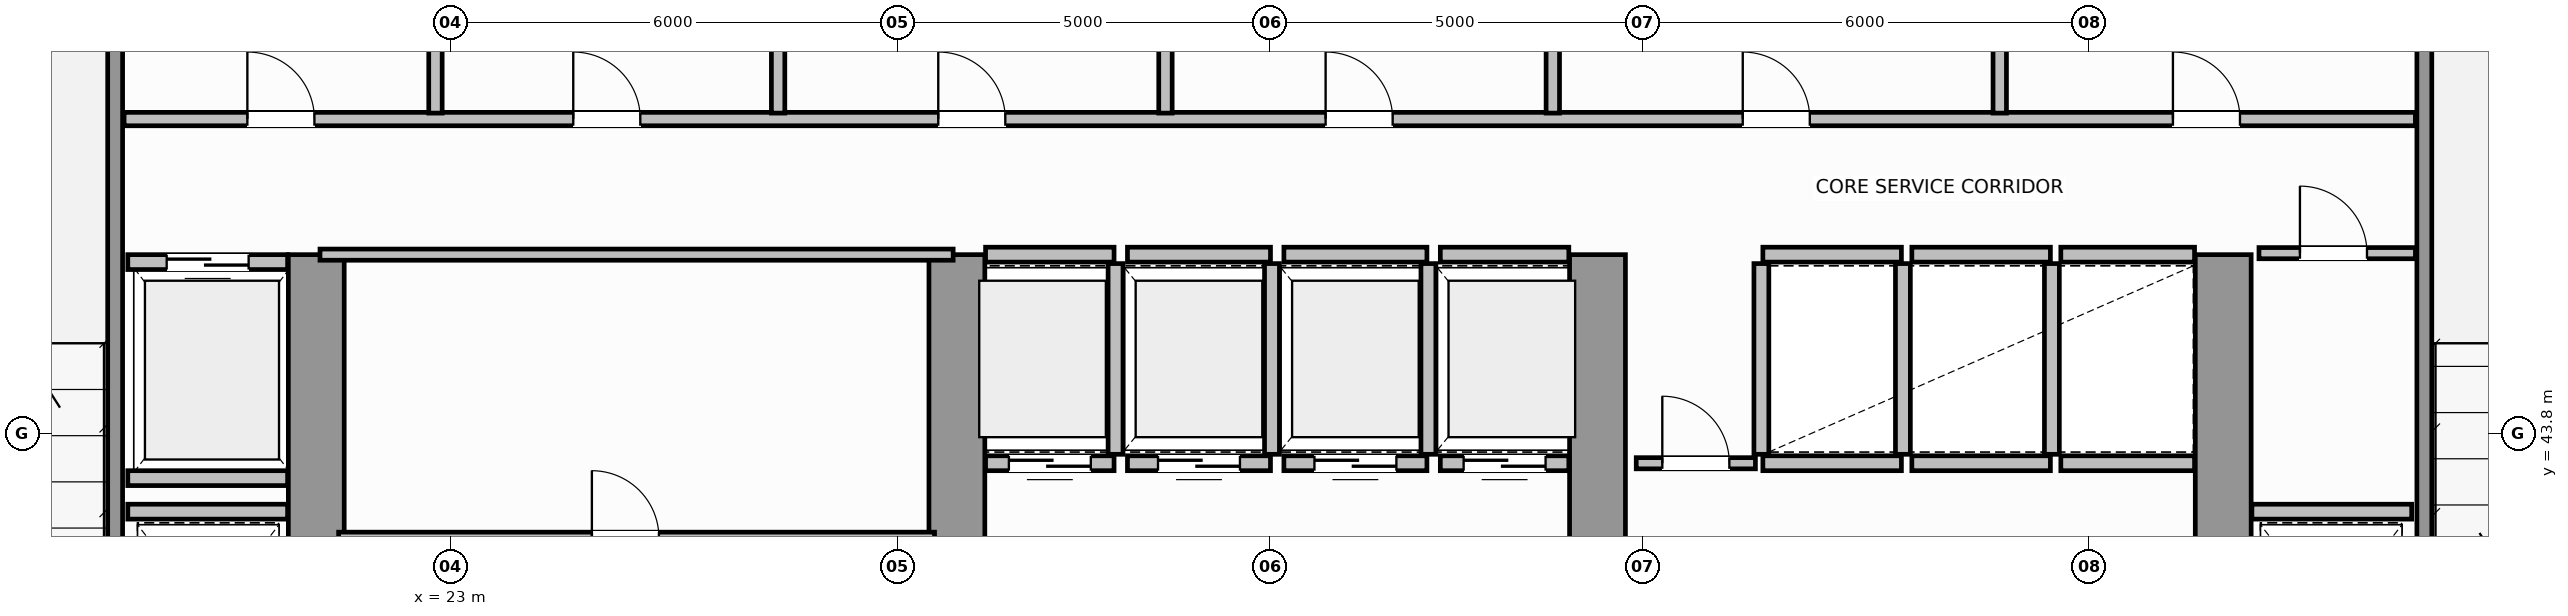
"""IFC4 building model, lengths in metres.
Left out: names, types, materials, properties, quantities, classifications, styles, units other than length and angle.
Written with IfcOpenShell. Run it as: python <this file> out.ifc"""

import sys

from ifc_helpers import new_model, si_unit, direction, frame, frame_2d, origin, place, context, subcontext, project, spatial, rectangle, extrude, source, transform, mapped, element, fill, save


model = new_model("IFC4")
c1 = context("Model", 3, precision=1e-05, world=origin(), true_north=direction((0.0, 1.0)))
c2 = subcontext(c1, "Body", "Model", "MODEL_VIEW")
j1 = project(units=[si_unit("LENGTHUNIT", "METRE"), si_unit("PLANEANGLEUNIT", "RADIAN")], contexts=[c1])
p1 = place(None, origin())
s1 = spatial("IfcSite", under=j1, at=p1, CompositionType="ELEMENT")
p2 = place(p1, origin())
s2 = spatial("IfcBuilding", under=s1, at=p2, CompositionType="ELEMENT")
p3 = place(p2, frame((0.0, 0.0, 126.2)))
s3 = spatial("IfcBuildingStorey", under=s2, at=p3, CompositionType="ELEMENT", Elevation=126.2)
for number, where, z_axis, x_axis in (
    (1, (21.2, 36.895, 0.0), (0.0, 0.0, 1.0), (0.0, 1.0, 0.0)),
    (2, (29.8, 36.895, 0.0), (0.0, 0.0, 1.0), (0.0, 1.0, 0.0)),
    (3, (38.4, 36.895, 0.0), (0.0, 0.0, 1.0), (0.0, 1.0, 0.0)),
    (4, (46.8, 36.895, 0.0), (0.0, 0.0, 1.0), (0.0, 1.0, 0.0)),
):
    element("IfcWall", number, at=place(p3, frame(where, z_axis=z_axis, x_axis=x_axis)), inside=s3, PredefinedType="SHEAR", context=c2, shape_type="SweptSolid", body=[
        extrude(rectangle(XDim=9.305, YDim=0.75, at=frame_2d((4.652, 0.0))), origin(), (0.0, 0.0, 1.0), 3.8),
    ])
for number, where, z_axis, x_axis in (
    (5, (18.5, 39.96, 0.0), (0.0, 0.0, 1.0), (0.0, 1.0, 0.0)),
    (6, (49.5, 39.96, 0.0), (0.0, 0.0, 1.0), (0.0, 1.0, 0.0)),
):
    element("IfcWall", number, at=place(p3, frame(where, z_axis=z_axis, x_axis=x_axis)), inside=s3, PredefinedType="SOLIDWALL", context=c2, shape_type="SweptSolid", body=[
        extrude(rectangle(XDim=9.93, YDim=0.2, at=frame_2d((4.965, 0.0))), origin(), (0.0, 0.0, 1.0), 3.8),
    ])
p4 = place(p3, frame((30.185, 43.4, 0.0), z_axis=(0.0, 0.0, 1.0), x_axis=(1.0, 0.0, 0.0)))
e7 = element("IfcWall", 7, at=p4, inside=s3, PredefinedType="SOLIDWALL", context=c2, shape_type="SweptSolid", body=[
    extrude(rectangle(XDim=1.725, YDim=0.2, at=frame_2d((0.862, 0.0))), origin(), (0.0, 0.0, 1.0), 3.58),
])
p5 = place(p4, frame((0.313, 0.0, 0.0)))
e8 = element("IfcOpeningElement", 8, at=p5, cuts=e7, PredefinedType="OPENING", context=c2, shape_type="SweptSolid", body=[
    extrude(rectangle(XDim=1.1, YDim=2.15, at=frame_2d((0.55, 1.075))), frame((0.0, 0.11, 0.0), z_axis=(0.0, -1.0, 0.0), x_axis=(1.0, 0.0, 0.0)), (0.0, 0.0, 1.0), 0.22),
])
p6 = place(p3, frame((30.185, 46.2, 0.0), z_axis=(0.0, 0.0, 1.0), x_axis=(1.0, 0.0, 0.0)))
e9 = element("IfcWall", 9, at=p6, inside=s3, PredefinedType="SOLIDWALL", context=c2, shape_type="SweptSolid", body=[
    extrude(rectangle(XDim=1.725, YDim=0.2, at=frame_2d((0.862, 0.0))), origin(), (0.0, 0.0, 1.0), 3.58),
])
p7 = place(p3, frame((31.93, 43.52, 0.0), z_axis=(0.0, 0.0, 1.0), x_axis=(0.0, 1.0, 0.0)))
e10 = element("IfcWall", 10, at=p7, inside=s3, PredefinedType="SOLIDWALL", context=c2, shape_type="SweptSolid", body=[
    extrude(rectangle(XDim=2.56, YDim=0.2, at=frame_2d((1.28, 0.0))), origin(), (0.0, 0.0, 1.0), 3.58),
])
p8 = place(p3, frame((32.09, 43.4, 0.0), z_axis=(0.0, 0.0, 1.0), x_axis=(1.0, 0.0, 0.0)))
e11 = element("IfcWall", 11, at=p8, inside=s3, PredefinedType="SOLIDWALL", context=c2, shape_type="SweptSolid", body=[
    extrude(rectangle(XDim=1.92, YDim=0.2, at=frame_2d((0.96, 0.0))), origin(), (0.0, 0.0, 1.0), 3.58),
])
p9 = place(p8, frame((0.41, 0.0, 0.0)))
e12 = element("IfcOpeningElement", 12, at=p9, cuts=e11, PredefinedType="OPENING", context=c2, shape_type="SweptSolid", body=[
    extrude(rectangle(XDim=1.1, YDim=2.15, at=frame_2d((0.55, 1.075))), frame((0.0, 0.11, 0.0), z_axis=(0.0, -1.0, 0.0), x_axis=(1.0, 0.0, 0.0)), (0.0, 0.0, 1.0), 0.22),
])
p10 = place(p3, frame((32.09, 46.2, 0.0), z_axis=(0.0, 0.0, 1.0), x_axis=(1.0, 0.0, 0.0)))
e13 = element("IfcWall", 13, at=p10, inside=s3, PredefinedType="SOLIDWALL", context=c2, shape_type="SweptSolid", body=[
    extrude(rectangle(XDim=1.92, YDim=0.2, at=frame_2d((0.96, 0.0))), origin(), (0.0, 0.0, 1.0), 3.58),
])
p11 = place(p3, frame((34.03, 43.52, 0.0), z_axis=(0.0, 0.0, 1.0), x_axis=(0.0, 1.0, 0.0)))
e14 = element("IfcWall", 14, at=p11, inside=s3, PredefinedType="SOLIDWALL", context=c2, shape_type="SweptSolid", body=[
    extrude(rectangle(XDim=2.56, YDim=0.2, at=frame_2d((1.28, 0.0))), origin(), (0.0, 0.0, 1.0), 3.58),
])
p12 = place(p3, frame((34.19, 43.4, 0.0), z_axis=(0.0, 0.0, 1.0), x_axis=(1.0, 0.0, 0.0)))
e15 = element("IfcWall", 15, at=p12, inside=s3, PredefinedType="SOLIDWALL", context=c2, shape_type="SweptSolid", body=[
    extrude(rectangle(XDim=1.92, YDim=0.2, at=frame_2d((0.96, 0.0))), origin(), (0.0, 0.0, 1.0), 3.58),
])
p13 = place(p12, frame((0.41, 0.0, 0.0)))
e16 = element("IfcOpeningElement", 16, at=p13, cuts=e15, PredefinedType="OPENING", context=c2, shape_type="SweptSolid", body=[
    extrude(rectangle(XDim=1.1, YDim=2.15, at=frame_2d((0.55, 1.075))), frame((0.0, 0.11, 0.0), z_axis=(0.0, -1.0, 0.0), x_axis=(1.0, 0.0, 0.0)), (0.0, 0.0, 1.0), 0.22),
])
p14 = place(p3, frame((34.19, 46.2, 0.0), z_axis=(0.0, 0.0, 1.0), x_axis=(1.0, 0.0, 0.0)))
e17 = element("IfcWall", 17, at=p14, inside=s3, PredefinedType="SOLIDWALL", context=c2, shape_type="SweptSolid", body=[
    extrude(rectangle(XDim=1.92, YDim=0.2, at=frame_2d((0.96, 0.0))), origin(), (0.0, 0.0, 1.0), 3.58),
])
p15 = place(p3, frame((36.13, 43.52, 0.0), z_axis=(0.0, 0.0, 1.0), x_axis=(0.0, 1.0, 0.0)))
e18 = element("IfcWall", 18, at=p15, inside=s3, PredefinedType="SOLIDWALL", context=c2, shape_type="SweptSolid", body=[
    extrude(rectangle(XDim=2.56, YDim=0.2, at=frame_2d((1.28, 0.0))), origin(), (0.0, 0.0, 1.0), 3.58),
])
p16 = place(p3, frame((36.29, 43.4, 0.0), z_axis=(0.0, 0.0, 1.0), x_axis=(1.0, 0.0, 0.0)))
e19 = element("IfcWall", 19, at=p16, inside=s3, PredefinedType="SOLIDWALL", context=c2, shape_type="SweptSolid", body=[
    extrude(rectangle(XDim=1.725, YDim=0.2, at=frame_2d((0.862, 0.0))), origin(), (0.0, 0.0, 1.0), 3.58),
])
p17 = place(p16, frame((0.313, 0.0, 0.0)))
e20 = element("IfcOpeningElement", 20, at=p17, cuts=e19, PredefinedType="OPENING", context=c2, shape_type="SweptSolid", body=[
    extrude(rectangle(XDim=1.1, YDim=2.15, at=frame_2d((0.55, 1.075))), frame((0.0, 0.11, 0.0), z_axis=(0.0, -1.0, 0.0), x_axis=(1.0, 0.0, 0.0)), (0.0, 0.0, 1.0), 0.22),
])
p18 = place(p3, frame((36.29, 46.2, 0.0), z_axis=(0.0, 0.0, 1.0), x_axis=(1.0, 0.0, 0.0)))
e21 = element("IfcWall", 21, at=p18, inside=s3, PredefinedType="SOLIDWALL", context=c2, shape_type="SweptSolid", body=[
    extrude(rectangle(XDim=1.725, YDim=0.2, at=frame_2d((0.862, 0.0))), origin(), (0.0, 0.0, 1.0), 3.58),
])
for number, where, z_axis, x_axis in (
    (22, (40.62, 43.4, 0.0), (0.0, 0.0, 1.0), (1.0, 0.0, 0.0)),
    (23, (40.62, 46.2, 0.0), (0.0, 0.0, 1.0), (1.0, 0.0, 0.0)),
):
    element("IfcWall", number, at=place(p3, frame(where, z_axis=z_axis, x_axis=x_axis)), inside=s3, PredefinedType="SOLIDWALL", context=c2, shape_type="SweptSolid", body=[
        extrude(rectangle(XDim=1.86, YDim=0.2, at=frame_2d((0.93, 0.0))), origin(), (0.0, 0.0, 1.0), 3.58),
    ])
for number, where, z_axis, x_axis in (
    (24, (40.6, 43.52, 0.0), (0.0, 0.0, 1.0), (0.0, 1.0, 0.0)),
    (25, (42.5, 43.52, 0.0), (0.0, 0.0, 1.0), (0.0, 1.0, 0.0)),
):
    element("IfcWall", number, at=place(p3, frame(where, z_axis=z_axis, x_axis=x_axis)), inside=s3, PredefinedType="SOLIDWALL", context=c2, shape_type="SweptSolid", body=[
        extrude(rectangle(XDim=2.56, YDim=0.2, at=frame_2d((1.28, 0.0))), origin(), (0.0, 0.0, 1.0), 3.58),
    ])
for number, where, z_axis, x_axis in (
    (26, (42.62, 43.4, 0.0), (0.0, 0.0, 1.0), (1.0, 0.0, 0.0)),
    (27, (42.62, 46.2, 0.0), (0.0, 0.0, 1.0), (1.0, 0.0, 0.0)),
):
    element("IfcWall", number, at=place(p3, frame(where, z_axis=z_axis, x_axis=x_axis)), inside=s3, PredefinedType="SOLIDWALL", context=c2, shape_type="SweptSolid", body=[
        extrude(rectangle(XDim=1.86, YDim=0.2, at=frame_2d((0.93, 0.0))), origin(), (0.0, 0.0, 1.0), 3.58),
    ])
p19 = place(p3, frame((44.5, 43.52, 0.0), z_axis=(0.0, 0.0, 1.0), x_axis=(0.0, 1.0, 0.0)))
e28 = element("IfcWall", 28, at=p19, inside=s3, PredefinedType="SOLIDWALL", context=c2, shape_type="SweptSolid", body=[
    extrude(rectangle(XDim=2.56, YDim=0.2, at=frame_2d((1.28, 0.0))), origin(), (0.0, 0.0, 1.0), 3.58),
])
for number, where, z_axis, x_axis in (
    (29, (44.62, 43.4, 0.0), (0.0, 0.0, 1.0), (1.0, 0.0, 0.0)),
    (30, (44.62, 46.2, 0.0), (0.0, 0.0, 1.0), (1.0, 0.0, 0.0)),
):
    element("IfcWall", number, at=place(p3, frame(where, z_axis=z_axis, x_axis=x_axis)), inside=s3, PredefinedType="SOLIDWALL", context=c2, shape_type="SweptSolid", body=[
        extrude(rectangle(XDim=1.795, YDim=0.2, at=frame_2d((0.897, 0.0))), origin(), (0.0, 0.0, 1.0), 3.58),
    ])
p20 = place(p3, frame((18.67, 46.1, 0.0), z_axis=(0.0, 0.0, 1.0), x_axis=(1.0, 0.0, 0.0)))
e31 = element("IfcWall", 31, at=p20, inside=s3, PredefinedType="SOLIDWALL", context=c2, shape_type="SweptSolid", body=[
    extrude(rectangle(XDim=2.145, YDim=0.2, at=frame_2d((1.073, 0.0))), origin(), (0.0, 0.0, 1.0), 3.58),
])
p21 = place(p20, frame((0.522, 0.0, 0.0)))
e32 = element("IfcOpeningElement", 32, at=p21, cuts=e31, PredefinedType="OPENING", context=c2, shape_type="SweptSolid", body=[
    extrude(rectangle(XDim=1.1, YDim=2.15, at=frame_2d((0.55, 1.075))), frame((0.0, 0.11, 0.0), z_axis=(0.0, -1.0, 0.0), x_axis=(1.0, 0.0, 0.0)), (0.0, 0.0, 1.0), 0.22),
])
for number, where, z_axis, x_axis in (
    (33, (18.67, 43.2, 0.0), (0.0, 0.0, 1.0), (1.0, 0.0, 0.0)),
    (34, (18.67, 42.75, 0.0), (0.0, 0.0, 1.0), (1.0, 0.0, 0.0)),
    (35, (47.185, 42.75, 0.0), (0.0, 0.0, 1.0), (1.0, 0.0, 0.0)),
):
    element("IfcWall", number, at=place(p3, frame(where, z_axis=z_axis, x_axis=x_axis)), inside=s3, PredefinedType="SOLIDWALL", context=c2, shape_type="SweptSolid", body=[
        extrude(rectangle(XDim=2.145, YDim=0.2, at=frame_2d((1.073, 0.0))), origin(), (0.0, 0.0, 1.0), 3.58),
    ])
p22 = place(p3, frame((21.25, 46.2, 0.0), z_axis=(0.0, 0.0, 1.0), x_axis=(1.0, 0.0, 0.0)))
e36 = element("IfcWall", 36, at=p22, inside=s3, PredefinedType="PARTITIONING", context=c2, shape_type="SweptSolid", body=[
    extrude(rectangle(XDim=8.5, YDim=0.15, at=frame_2d((4.25, 0.0))), origin(), (0.0, 0.0, 1.0), 3.58),
])
p23 = place(p3, frame((21.5, 42.4, 0.0), z_axis=(0.0, 0.0, 1.0), x_axis=(1.0, 0.0, 0.0)))
e37 = element("IfcWall", 37, at=p23, inside=s3, PredefinedType="PARTITIONING", context=c2, shape_type="SweptSolid", body=[
    extrude(rectangle(XDim=8.0, YDim=0.15, at=frame_2d((4.0, 0.0))), origin(), (0.0, 0.0, 1.0), 3.58),
])
p24 = place(p23, frame((3.4, 0.0, 0.0)))
e38 = element("IfcOpeningElement", 38, at=p24, cuts=e37, PredefinedType="OPENING", context=c2, shape_type="SweptSolid", body=[
    extrude(rectangle(XDim=0.9, YDim=2.1, at=frame_2d((0.45, 1.05))), frame((0.0, 0.085, 0.0), z_axis=(0.0, -1.0, 0.0), x_axis=(1.0, 0.0, 0.0)), (0.0, 0.0, 1.0), 0.17),
])
p25 = place(p3, frame((47.28, 46.22, 0.0), z_axis=(0.0, 0.0, 1.0), x_axis=(1.0, 0.0, 0.0)))
e39 = element("IfcWall", 39, at=p25, inside=s3, PredefinedType="PARTITIONING", context=c2, shape_type="SweptSolid", body=[
    extrude(rectangle(XDim=2.1, YDim=0.15, at=frame_2d((1.05, 0.0))), origin(), (0.0, 0.0, 1.0), 3.58),
])
p26 = place(p25, frame((0.55, 0.0, 0.0)))
e40 = element("IfcOpeningElement", 40, at=p26, cuts=e39, PredefinedType="OPENING", context=c2, shape_type="SweptSolid", body=[
    extrude(rectangle(XDim=0.9, YDim=2.1, at=frame_2d((0.45, 1.05))), frame((0.0, 0.085, 0.0), z_axis=(0.0, -1.0, 0.0), x_axis=(1.0, 0.0, 0.0)), (0.0, 0.0, 1.0), 0.17),
])
p27 = place(p3, frame((38.92, 43.4, 0.0), z_axis=(0.0, 0.0, 1.0), x_axis=(1.0, 0.0, 0.0)))
e41 = element("IfcWall", 41, at=p27, inside=s3, PredefinedType="PARTITIONING", context=c2, shape_type="SweptSolid", body=[
    extrude(rectangle(XDim=1.6, YDim=0.15, at=frame_2d((0.8, 0.0))), origin(), (0.0, 0.0, 1.0), 3.58),
])
p28 = place(p27, frame((0.35, 0.0, 0.0)))
e42 = element("IfcOpeningElement", 42, at=p28, cuts=e41, PredefinedType="OPENING", context=c2, shape_type="SweptSolid", body=[
    extrude(rectangle(XDim=0.9, YDim=2.1, at=frame_2d((0.45, 1.05))), frame((0.0, 0.085, 0.0), z_axis=(0.0, -1.0, 0.0), x_axis=(1.0, 0.0, 0.0)), (0.0, 0.0, 1.0), 0.17),
])
p29 = place(p3, frame((18.62, 48.02, 0.0), z_axis=(0.0, 0.0, 1.0), x_axis=(1.0, 0.0, 0.0)))
e43 = element("IfcWall", 43, at=p29, inside=s3, PredefinedType="PLUMBINGWALL", context=c2, shape_type="SweptSolid", body=[
    extrude(rectangle(XDim=30.76, YDim=0.18, at=frame_2d((15.38, 0.0))), origin(), (0.0, 0.0, 1.0), 3.58),
])
p30 = place(p29, frame((1.655, 0.0, 0.0)))
e44 = element("IfcOpeningElement", 44, at=p30, cuts=e43, PredefinedType="OPENING", context=c2, shape_type="SweptSolid", body=[
    extrude(rectangle(XDim=0.9, YDim=2.15, at=frame_2d((0.45, 1.075))), frame((0.0, 0.1, 0.0), z_axis=(0.0, -1.0, 0.0), x_axis=(1.0, 0.0, 0.0)), (0.0, 0.0, 1.0), 0.2),
])
p31 = place(p29, frame((6.03, 0.0, 0.0)))
e45 = element("IfcOpeningElement", 45, at=p31, cuts=e43, PredefinedType="OPENING", context=c2, shape_type="SweptSolid", body=[
    extrude(rectangle(XDim=0.9, YDim=2.15, at=frame_2d((0.45, 1.075))), frame((0.0, 0.1, 0.0), z_axis=(0.0, -1.0, 0.0), x_axis=(1.0, 0.0, 0.0)), (0.0, 0.0, 1.0), 0.2),
])
p32 = place(p29, frame((10.93, 0.0, 0.0)))
e46 = element("IfcOpeningElement", 46, at=p32, cuts=e43, PredefinedType="OPENING", context=c2, shape_type="SweptSolid", body=[
    extrude(rectangle(XDim=0.9, YDim=2.15, at=frame_2d((0.45, 1.075))), frame((0.0, 0.1, 0.0), z_axis=(0.0, -1.0, 0.0), x_axis=(1.0, 0.0, 0.0)), (0.0, 0.0, 1.0), 0.2),
])
p33 = place(p29, frame((16.13, 0.0, 0.0)))
e47 = element("IfcOpeningElement", 47, at=p33, cuts=e43, PredefinedType="OPENING", context=c2, shape_type="SweptSolid", body=[
    extrude(rectangle(XDim=0.9, YDim=2.15, at=frame_2d((0.45, 1.075))), frame((0.0, 0.1, 0.0), z_axis=(0.0, -1.0, 0.0), x_axis=(1.0, 0.0, 0.0)), (0.0, 0.0, 1.0), 0.2),
])
p34 = place(p29, frame((21.73, 0.0, 0.0)))
e48 = element("IfcOpeningElement", 48, at=p34, cuts=e43, PredefinedType="OPENING", context=c2, shape_type="SweptSolid", body=[
    extrude(rectangle(XDim=0.9, YDim=2.15, at=frame_2d((0.45, 1.075))), frame((0.0, 0.1, 0.0), z_axis=(0.0, -1.0, 0.0), x_axis=(1.0, 0.0, 0.0)), (0.0, 0.0, 1.0), 0.2),
])
p35 = place(p29, frame((27.505, 0.0, 0.0)))
e49 = element("IfcOpeningElement", 49, at=p35, cuts=e43, PredefinedType="OPENING", context=c2, shape_type="SweptSolid", body=[
    extrude(rectangle(XDim=0.9, YDim=2.15, at=frame_2d((0.45, 1.075))), frame((0.0, 0.1, 0.0), z_axis=(0.0, -1.0, 0.0), x_axis=(1.0, 0.0, 0.0)), (0.0, 0.0, 1.0), 0.2),
])
p36 = place(p3, frame((22.8, 48.1, 0.0), z_axis=(0.0, 0.0, 1.0), x_axis=(0.0, 1.0, 0.0)))
e50 = element("IfcWall", 50, at=p36, inside=s3, PredefinedType="PLUMBINGWALL", context=c2, shape_type="SweptSolid", body=[
    extrude(rectangle(XDim=2.13, YDim=0.18, at=frame_2d((1.065, 0.0))), origin(), (0.0, 0.0, 1.0), 2.87),
])
for number, where, z_axis, x_axis in (
    (51, (27.4, 48.1, 0.0), (0.0, 0.0, 1.0), (0.0, 1.0, 0.0)),
    (52, (32.6, 48.1, 0.0), (0.0, 0.0, 1.0), (0.0, 1.0, 0.0)),
    (53, (37.8, 48.1, 0.0), (0.0, 0.0, 1.0), (0.0, 1.0, 0.0)),
    (54, (43.8, 48.1, 0.0), (0.0, 0.0, 1.0), (0.0, 1.0, 0.0)),
):
    element("IfcWall", number, at=place(p3, frame(where, z_axis=z_axis, x_axis=x_axis)), inside=s3, PredefinedType="PLUMBINGWALL", context=c2, shape_type="SweptSolid", body=[
        extrude(rectangle(XDim=2.13, YDim=0.18, at=frame_2d((1.065, 0.0))), origin(), (0.0, 0.0, 1.0), 3.58),
    ])
m1 = source(origin(), c2, "Body", "SweptSolid", [
    extrude(rectangle(XDim=1.1, YDim=2.15, at=frame_2d((0.55, 1.075))), frame((0.0, 0.025, 0.0), z_axis=(0.0, -1.0, 0.0), x_axis=(1.0, 0.0, 0.0)), (0.0, 0.0, 1.0), 0.05),
])
p37 = place(p5, origin())
e55 = element("IfcDoor", 55, at=p37, inside=s3, OperationType="DOUBLE_DOOR_SLIDING", PredefinedType="DOOR", context=c2, shape_type="MappedRepresentation", body=[
    mapped(m1, transform((0.0, 0.0, 0.0), scale=1.0)),
])
fill(e8, e55)
p38 = place(p9, origin())
e56 = element("IfcDoor", 56, at=p38, inside=s3, OperationType="DOUBLE_DOOR_SLIDING", PredefinedType="DOOR", context=c2, shape_type="MappedRepresentation", body=[
    mapped(m1, transform((0.0, 0.0, 0.0), scale=1.0)),
])
fill(e12, e56)
p39 = place(p13, origin())
e57 = element("IfcDoor", 57, at=p39, inside=s3, OperationType="DOUBLE_DOOR_SLIDING", PredefinedType="DOOR", context=c2, shape_type="MappedRepresentation", body=[
    mapped(m1, transform((0.0, 0.0, 0.0), scale=1.0)),
])
fill(e16, e57)
p40 = place(p17, origin())
e58 = element("IfcDoor", 58, at=p40, inside=s3, OperationType="DOUBLE_DOOR_SLIDING", PredefinedType="DOOR", context=c2, shape_type="MappedRepresentation", body=[
    mapped(m1, transform((0.0, 0.0, 0.0), scale=1.0)),
])
fill(e20, e58)
p41 = place(p21, origin())
e59 = element("IfcDoor", 59, at=p41, inside=s3, OperationType="DOUBLE_DOOR_SLIDING", PredefinedType="DOOR", context=c2, shape_type="MappedRepresentation", body=[
    mapped(m1, transform((0.0, 0.0, 0.0), scale=1.0)),
])
fill(e32, e59)
m2 = source(origin(), c2, "Body", "SweptSolid", [
    extrude(rectangle(XDim=0.9, YDim=2.1, at=frame_2d((0.45, 1.05))), frame((0.0, 0.025, 0.0), z_axis=(0.0, -1.0, 0.0), x_axis=(1.0, 0.0, 0.0)), (0.0, 0.0, 1.0), 0.05),
])
p42 = place(p24, origin())
e60 = element("IfcDoor", 60, at=p42, inside=s3, OperationType="SINGLE_SWING_RIGHT", PredefinedType="DOOR", context=c2, shape_type="MappedRepresentation", body=[
    mapped(m2, transform((0.0, 0.0, 0.0), scale=1.0)),
])
fill(e38, e60)
p43 = place(p26, origin())
e61 = element("IfcDoor", 61, at=p43, inside=s3, OperationType="SINGLE_SWING_RIGHT", PredefinedType="DOOR", context=c2, shape_type="MappedRepresentation", body=[
    mapped(m2, transform((0.0, 0.0, 0.0), scale=1.0)),
])
fill(e40, e61)
p44 = place(p28, origin())
e62 = element("IfcDoor", 62, at=p44, inside=s3, OperationType="SINGLE_SWING_LEFT", PredefinedType="DOOR", context=c2, shape_type="MappedRepresentation", body=[
    mapped(m2, transform((0.0, 0.0, 0.0), scale=1.0)),
])
fill(e42, e62)
m3 = source(origin(), c2, "Body", "SweptSolid", [
    extrude(rectangle(XDim=0.9, YDim=2.15, at=frame_2d((0.45, 1.075))), frame((0.0, 0.025, 0.0), z_axis=(0.0, -1.0, 0.0), x_axis=(1.0, 0.0, 0.0)), (0.0, 0.0, 1.0), 0.05),
])
p45 = place(p30, origin())
e63 = element("IfcDoor", 63, at=p45, inside=s3, OperationType="SINGLE_SWING_LEFT", PredefinedType="DOOR", context=c2, shape_type="MappedRepresentation", body=[
    mapped(m3, transform((0.0, 0.0, 0.0), scale=1.0)),
])
fill(e44, e63)
p46 = place(p31, origin())
e64 = element("IfcDoor", 64, at=p46, inside=s3, OperationType="SINGLE_SWING_RIGHT", PredefinedType="DOOR", context=c2, shape_type="MappedRepresentation", body=[
    mapped(m3, transform((0.0, 0.0, 0.0), scale=1.0)),
])
fill(e45, e64)
p47 = place(p32, origin())
e65 = element("IfcDoor", 65, at=p47, inside=s3, OperationType="SINGLE_SWING_LEFT", PredefinedType="DOOR", context=c2, shape_type="MappedRepresentation", body=[
    mapped(m3, transform((0.0, 0.0, 0.0), scale=1.0)),
])
fill(e46, e65)
p48 = place(p33, origin())
e66 = element("IfcDoor", 66, at=p48, inside=s3, OperationType="SINGLE_SWING_RIGHT", PredefinedType="DOOR", context=c2, shape_type="MappedRepresentation", body=[
    mapped(m3, transform((0.0, 0.0, 0.0), scale=1.0)),
])
fill(e47, e66)
p49 = place(p34, origin())
e67 = element("IfcDoor", 67, at=p49, inside=s3, OperationType="SINGLE_SWING_LEFT", PredefinedType="DOOR", context=c2, shape_type="MappedRepresentation", body=[
    mapped(m3, transform((0.0, 0.0, 0.0), scale=1.0)),
])
fill(e48, e67)
p50 = place(p35, origin())
e68 = element("IfcDoor", 68, at=p50, inside=s3, OperationType="SINGLE_SWING_RIGHT", PredefinedType="DOOR", context=c2, shape_type="MappedRepresentation", body=[
    mapped(m3, transform((0.0, 0.0, 0.0), scale=1.0)),
])
fill(e49, e68)
save(model, sys.argv[1])
